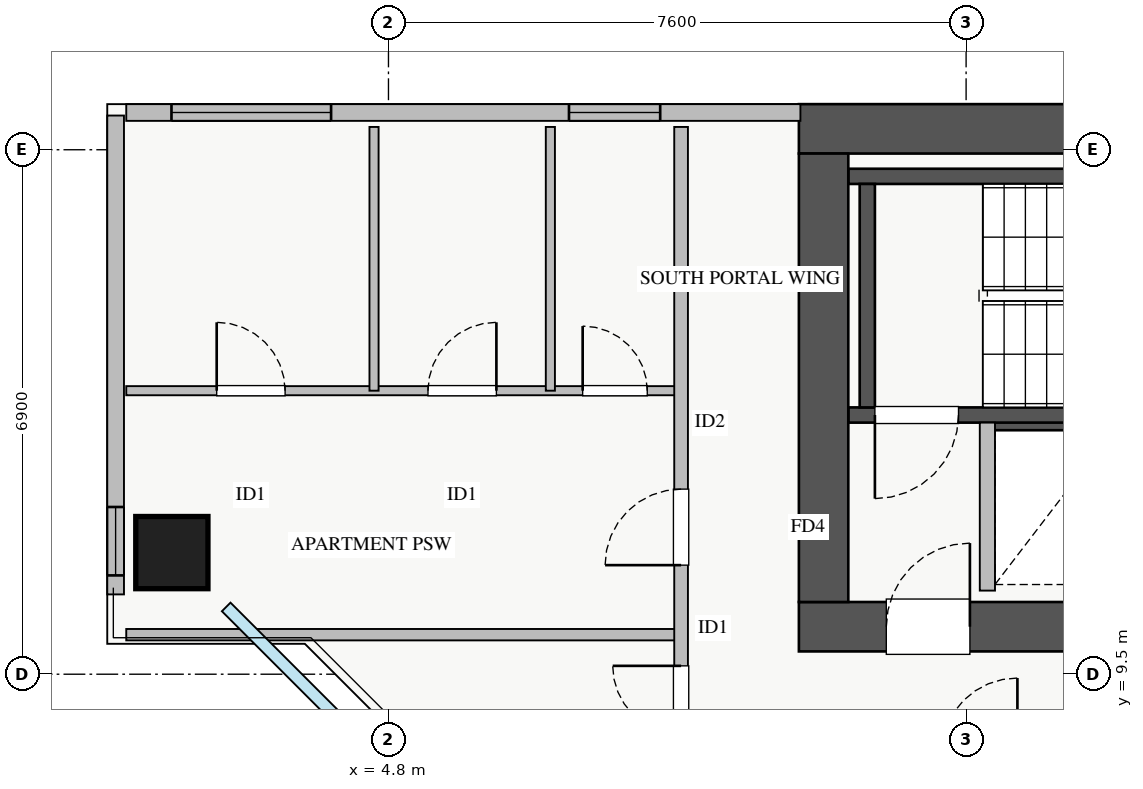
"""IFC4 building model, lengths in metres.
Left out: names, types, materials, properties, quantities, classifications, styles, units other than length and angle.
Written with IfcOpenShell. Run it as: python <this file> out.ifc"""

import sys

from ifc_helpers import new_model, si_unit, direction, frame, frame_2d, origin, origin_2d, place, context, subcontext, project, spatial, rectangle, extrude, source, transform, mapped, element, fill, save


model = new_model("IFC4")
c1 = context("Model", 3, precision=1e-05, world=origin(), true_north=direction((0.0, 1.0)))
c2 = subcontext(c1, "Body", "Model", "MODEL_VIEW")
j1 = project(units=[si_unit("LENGTHUNIT", "METRE"), si_unit("PLANEANGLEUNIT", "RADIAN")], contexts=[c1])
p1 = place(None, origin())
s1 = spatial("IfcSite", under=j1, at=p1, CompositionType="ELEMENT")
p2 = place(p1, origin())
s2 = spatial("IfcBuilding", under=s1, at=p2, CompositionType="ELEMENT")
p3 = place(p2, frame((0.0, 0.0, 160.0)))
s3 = spatial("IfcBuildingStorey", under=s2, at=p3, CompositionType="ELEMENT", Elevation=160.0)
p4 = place(p3, frame((12.68, 12.8, 0.0), z_axis=(0.0, 0.0, 1.0), x_axis=(1.0, 0.0, 0.0)))
e1 = element("IfcWall", 1, at=p4, inside=s3, PredefinedType="SHEAR", context=c2, shape_type="SweptSolid", body=[
    extrude(rectangle(XDim=1.94, YDim=0.18, at=frame_2d((0.97, 0.0))), origin(), (0.0, 0.0, 1.0), 3.07),
])
p5 = place(p3, frame((10.85, 12.91, 0.0), z_axis=(0.0, 0.0, 1.0), x_axis=(1.0, 0.0, 0.0)))
e2 = element("IfcWall", 2, at=p5, inside=s3, PredefinedType="SHEAR", context=c2, shape_type="SweptSolid", body=[
    extrude(rectangle(XDim=7.3, YDim=0.2, at=frame_2d((3.65, 0.0))), origin(), (0.0, 0.0, 1.0), 3.25),
])
p6 = place(p5, frame((0.35, 0.0, 0.0)))
e3 = element("IfcOpeningElement", 3, at=p6, cuts=e2, PredefinedType="OPENING", context=c2, shape_type="SweptSolid", body=[
    extrude(rectangle(XDim=1.1, YDim=2.05, at=frame_2d((0.55, 1.025))), frame((0.0, 0.11, 0.0), z_axis=(0.0, -1.0, 0.0), x_axis=(1.0, 0.0, 0.0)), (0.0, 0.0, 1.0), 0.22),
])
p7 = place(p3, frame((10.85, 16.05, 0.0), z_axis=(0.0, 0.0, 1.0), x_axis=(1.0, 0.0, 0.0)))
e4 = element("IfcWall", 4, at=p7, inside=s3, PredefinedType="SHEAR", context=c2, shape_type="SweptSolid", body=[
    extrude(rectangle(XDim=7.3, YDim=0.2, at=frame_2d((3.65, 0.0))), origin(), (0.0, 0.0, 1.0), 3.25),
])
p8 = place(p3, frame((11.1, 13.01, 0.0), z_axis=(0.0, 0.0, 1.0), x_axis=(0.0, 1.0, 0.0)))
e5 = element("IfcWall", 5, at=p8, inside=s3, PredefinedType="SHEAR", context=c2, shape_type="SweptSolid", body=[
    extrude(rectangle(XDim=2.94, YDim=0.2, at=frame_2d((1.47, 0.0))), origin(), (0.0, 0.0, 1.0), 3.25),
])
p9 = place(p3, frame((10.2, 10.125, 0.0), z_axis=(0.0, 0.0, 1.0), x_axis=(1.0, 0.0, 0.0)))
e6 = element("IfcWall", 6, at=p9, inside=s3, PredefinedType="SHEAR", context=c2, shape_type="SweptSolid", body=[
    extrude(rectangle(XDim=17.6, YDim=0.65, at=frame_2d((8.8, 0.0))), origin(), (0.0, 0.0, 1.0), 3.25),
])
p10 = place(p9, frame((1.15, 0.0, 0.0)))
e7 = element("IfcOpeningElement", 7, at=p10, cuts=e6, PredefinedType="OPENING", context=c2, shape_type="SweptSolid", body=[
    extrude(rectangle(XDim=1.1, YDim=2.05, at=frame_2d((0.55, 1.025))), frame((0.0, 0.335, 0.0), z_axis=(0.0, -1.0, 0.0), x_axis=(1.0, 0.0, 0.0)), (0.0, 0.0, 1.0), 0.67),
])
p11 = place(p9, frame((8.3, 0.0, 0.0)))
e8 = element("IfcOpeningElement", 8, at=p11, cuts=e6, PredefinedType="OPENING", context=c2, shape_type="SweptSolid", body=[
    extrude(rectangle(XDim=1.1, YDim=2.05, at=frame_2d((0.55, 1.025))), frame((0.0, 0.335, 0.0), z_axis=(0.0, -1.0, 0.0), x_axis=(1.0, 0.0, 0.0)), (0.0, 0.0, 1.0), 0.67),
])
p12 = place(p9, frame((4.9, 0.0, 0.0)))
e9 = element("IfcOpeningElement", 9, at=p12, cuts=e6, PredefinedType="OPENING", context=c2, shape_type="SweptSolid", body=[
    extrude(rectangle(XDim=1.1, YDim=2.05, at=frame_2d((0.55, 1.025))), frame((0.0, 0.335, 0.0), z_axis=(0.0, -1.0, 0.0), x_axis=(1.0, 0.0, 0.0)), (0.0, 0.0, 1.0), 0.67),
])
p13 = place(p9, frame((14.74, 0.0, 0.0)))
e10 = element("IfcOpeningElement", 10, at=p13, cuts=e6, PredefinedType="OPENING", context=c2, shape_type="SweptSolid", body=[
    extrude(rectangle(XDim=1.0, YDim=2.05, at=frame_2d((0.5, 1.025))), frame((0.0, 0.335, 0.0), z_axis=(0.0, -1.0, 0.0), x_axis=(1.0, 0.0, 0.0)), (0.0, 0.0, 1.0), 0.67),
])
p14 = place(p9, frame((10.64, 0.0, 0.0)))
e11 = element("IfcOpeningElement", 11, at=p14, cuts=e6, PredefinedType="OPENING", context=c2, shape_type="SweptSolid", body=[
    extrude(rectangle(XDim=1.0, YDim=2.05, at=frame_2d((0.5, 1.025))), frame((0.0, 0.335, 0.0), z_axis=(0.0, -1.0, 0.0), x_axis=(1.0, 0.0, 0.0)), (0.0, 0.0, 1.0), 0.67),
])
p15 = place(p9, frame((13.09, 0.0, 0.0)))
e12 = element("IfcOpeningElement", 12, at=p15, cuts=e6, PredefinedType="OPENING", context=c2, shape_type="SweptSolid", body=[
    extrude(rectangle(XDim=1.0, YDim=2.05, at=frame_2d((0.5, 1.025))), frame((0.0, 0.335, 0.0), z_axis=(0.0, -1.0, 0.0), x_axis=(1.0, 0.0, 0.0)), (0.0, 0.0, 1.0), 0.67),
])
p16 = place(p3, frame((10.2, 16.675, 0.0), z_axis=(0.0, 0.0, 1.0), x_axis=(1.0, 0.0, 0.0)))
e13 = element("IfcWall", 13, at=p16, inside=s3, PredefinedType="SHEAR", context=c2, shape_type="SweptSolid", body=[
    extrude(rectangle(XDim=17.6, YDim=0.65, at=frame_2d((8.8, 0.0))), origin(), (0.0, 0.0, 1.0), 3.25),
])
p17 = place(p3, frame((10.525, 10.45, 0.0), z_axis=(0.0, 0.0, 1.0), x_axis=(0.0, 1.0, 0.0)))
e14 = element("IfcWall", 14, at=p17, inside=s3, PredefinedType="SHEAR", context=c2, shape_type="SweptSolid", body=[
    extrude(rectangle(XDim=5.9, YDim=0.65, at=frame_2d((2.95, 0.0))), origin(), (0.0, 0.0, 1.0), 3.25),
])
m1 = source(origin(), c2, "Body", "SweptSolid", [
    extrude(rectangle(XDim=0.95, YDim=0.95, at=origin_2d()), origin(), (0.0, 0.0, 1.0), 3.25),
])
p18 = place(p3, frame((1.95, 11.1, 0.0), z_axis=(0.0, 0.0, 1.0), x_axis=(1.0, 0.0, 0.0)))
e15 = element("IfcColumn", 15, at=p18, inside=s3, PredefinedType="COLUMN", context=c2, shape_type="MappedRepresentation", body=[
    mapped(m1, transform((0.0, 0.0, 0.0), x_axis=(1.0, 0.0, 0.0), y_axis=(0.0, 1.0, 0.0), z_axis=(0.0, 0.0, 1.0), scale=1.0)),
])
p19 = place(p3, frame((1.35, 16.89, 0.0), z_axis=(0.0, 0.0, 1.0), x_axis=(1.0, 0.0, 0.0)))
e16 = element("IfcWall", 16, at=p19, inside=s3, PredefinedType="STANDARD", context=c2, shape_type="SweptSolid", body=[
    extrude(rectangle(XDim=8.87, YDim=0.22, at=frame_2d((4.435, 0.0))), origin(), (0.0, 0.0, 1.0), 2.61),
])
p20 = place(p19, frame((0.595, 0.0, 0.9)))
e17 = element("IfcOpeningElement", 17, at=p20, cuts=e16, PredefinedType="OPENING", context=c2, shape_type="SweptSolid", body=[
    extrude(rectangle(XDim=2.1, YDim=1.5, at=frame_2d((1.05, 0.75))), frame((0.0, 0.12, 0.0), z_axis=(0.0, -1.0, 0.0), x_axis=(1.0, 0.0, 0.0)), (0.0, 0.0, 1.0), 0.24),
])
p21 = place(p19, frame((5.825, 0.0, 0.9)))
e18 = element("IfcOpeningElement", 18, at=p21, cuts=e16, PredefinedType="OPENING", context=c2, shape_type="SweptSolid", body=[
    extrude(rectangle(XDim=1.2, YDim=1.4, at=frame_2d((0.6, 0.7))), frame((0.0, 0.12, 0.0), z_axis=(0.0, -1.0, 0.0), x_axis=(1.0, 0.0, 0.0)), (0.0, 0.0, 1.0), 0.24),
])
p22 = place(p3, frame((1.21, 10.55, 0.0), z_axis=(0.0, 0.0, 1.0), x_axis=(0.0, 1.0, 0.0)))
e19 = element("IfcWall", 19, at=p22, inside=s3, PredefinedType="STANDARD", context=c2, shape_type="SweptSolid", body=[
    extrude(rectangle(XDim=6.3, YDim=0.22, at=frame_2d((3.15, 0.0))), origin(), (0.0, 0.0, 1.0), 2.61),
])
p23 = place(p22, frame((0.25, 0.0, 0.9)))
e20 = element("IfcOpeningElement", 20, at=p23, cuts=e19, PredefinedType="OPENING", context=c2, shape_type="SweptSolid", body=[
    extrude(rectangle(XDim=0.9, YDim=1.2, at=frame_2d((0.45, 0.6))), frame((0.0, 0.12, 0.0), z_axis=(0.0, -1.0, 0.0), x_axis=(1.0, 0.0, 0.0)), (0.0, 0.0, 1.0), 0.24),
])
p24 = place(p3, frame((12.68, 10.6, 0.0), z_axis=(0.0, 0.0, 1.0), x_axis=(0.0, 1.0, 0.0)))
e21 = element("IfcWall", 21, at=p24, inside=s3, PredefinedType="PARTITIONING", context=c2, shape_type="SweptSolid", body=[
    extrude(rectangle(XDim=2.21, YDim=0.2, at=frame_2d((1.105, 0.0))), origin(), (0.0, 0.0, 1.0), 3.07),
])
p25 = place(p3, frame((1.35, 13.23, 0.0), z_axis=(0.0, 0.0, 1.0), x_axis=(1.0, 0.0, 0.0)))
e22 = element("IfcWall", 22, at=p25, inside=s3, PredefinedType="PLUMBINGWALL", context=c2, shape_type="SweptSolid", body=[
    extrude(rectangle(XDim=7.3, YDim=0.12, at=frame_2d((3.65, 0.0))), origin(), (0.0, 0.0, 1.0), 3.07),
])
p26 = place(p25, frame((1.19, 0.0, 0.0)))
e23 = element("IfcOpeningElement", 23, at=p26, cuts=e22, PredefinedType="OPENING", context=c2, shape_type="SweptSolid", body=[
    extrude(rectangle(XDim=0.9, YDim=2.05, at=frame_2d((0.45, 1.025))), frame((0.0, 0.07, 0.0), z_axis=(0.0, -1.0, 0.0), x_axis=(1.0, 0.0, 0.0)), (0.0, 0.0, 1.0), 0.14),
])
p27 = place(p25, frame((3.97, 0.0, 0.0)))
e24 = element("IfcOpeningElement", 24, at=p27, cuts=e22, PredefinedType="OPENING", context=c2, shape_type="SweptSolid", body=[
    extrude(rectangle(XDim=0.9, YDim=2.05, at=frame_2d((0.45, 1.025))), frame((0.0, 0.07, 0.0), z_axis=(0.0, -1.0, 0.0), x_axis=(1.0, 0.0, 0.0)), (0.0, 0.0, 1.0), 0.14),
])
p28 = place(p25, frame((6.005, 0.0, 0.0)))
e25 = element("IfcOpeningElement", 25, at=p28, cuts=e22, PredefinedType="OPENING", context=c2, shape_type="SweptSolid", body=[
    extrude(rectangle(XDim=0.85, YDim=2.05, at=frame_2d((0.425, 1.025))), frame((0.0, 0.07, 0.0), z_axis=(0.0, -1.0, 0.0), x_axis=(1.0, 0.0, 0.0)), (0.0, 0.0, 1.0), 0.14),
])
for number, where, z_axis, x_axis in (
    (26, (4.61, 13.23, 0.0), (0.0, 0.0, 1.0), (0.0, 1.0, 0.0)),
    (27, (6.93, 13.23, 0.0), (0.0, 0.0, 1.0), (0.0, 1.0, 0.0)),
):
    element("IfcWall", number, at=place(p3, frame(where, z_axis=z_axis, x_axis=x_axis)), inside=s3, PredefinedType="PLUMBINGWALL", context=c2, shape_type="SweptSolid", body=[
        extrude(rectangle(XDim=3.47, YDim=0.12, at=frame_2d((1.735, 0.0))), origin(), (0.0, 0.0, 1.0), 3.07),
    ])
p29 = place(p3, frame((1.35, 10.02, 0.0), z_axis=(0.0, 0.0, 1.0), x_axis=(1.0, 0.0, 0.0)))
e28 = element("IfcWall", 28, at=p29, inside=s3, PredefinedType="PARTITIONING", context=c2, shape_type="SweptSolid", body=[
    extrude(rectangle(XDim=7.3, YDim=0.15, at=frame_2d((3.65, 0.0))), origin(), (0.0, 0.0, 1.0), 3.07),
])
p30 = place(p3, frame((8.65, 5.35, 0.0), z_axis=(0.0, 0.0, 1.0), x_axis=(0.0, 1.0, 0.0)))
e29 = element("IfcWall", 29, at=p30, inside=s3, PredefinedType="PARTITIONING", context=c2, shape_type="SweptSolid", body=[
    extrude(rectangle(XDim=11.35, YDim=0.18, at=frame_2d((5.675, 0.0))), origin(), (0.0, 0.0, 1.0), 3.07),
])
p31 = place(p30, frame((3.36, 0.0, 0.0)))
e30 = element("IfcOpeningElement", 30, at=p31, cuts=e29, PredefinedType="OPENING", context=c2, shape_type="SweptSolid", body=[
    extrude(rectangle(XDim=0.9, YDim=2.05, at=frame_2d((0.45, 1.025))), frame((0.0, 0.1, 0.0), z_axis=(0.0, -1.0, 0.0), x_axis=(1.0, 0.0, 0.0)), (0.0, 0.0, 1.0), 0.2),
])
p32 = place(p30, frame((5.585, 0.0, 0.0)))
e31 = element("IfcOpeningElement", 31, at=p32, cuts=e29, PredefinedType="OPENING", context=c2, shape_type="SweptSolid", body=[
    extrude(rectangle(XDim=1.0, YDim=2.05, at=frame_2d((0.5, 1.025))), frame((0.0, 0.1, 0.0), z_axis=(0.0, -1.0, 0.0), x_axis=(1.0, 0.0, 0.0)), (0.0, 0.0, 1.0), 0.2),
])
m2 = source(origin(), c2, "Body", "SweptSolid", [
    extrude(rectangle(XDim=2.1, YDim=1.5, at=frame_2d((1.05, 0.75))), frame((0.0, 0.03, 0.0), z_axis=(0.0, -1.0, 0.0), x_axis=(1.0, 0.0, 0.0)), (0.0, 0.0, 1.0), 0.06),
])
p33 = place(p20, origin())
e32 = element("IfcWindow", 32, at=p33, inside=s3, PartitioningType="TRIPLE_PANEL_VERTICAL", PredefinedType="WINDOW", context=c2, shape_type="MappedRepresentation", body=[
    mapped(m2, transform((0.0, 0.0, 0.0), x_axis=(1.0, 0.0, 0.0), y_axis=(0.0, 1.0, 0.0), z_axis=(0.0, 0.0, 1.0), scale=1.0)),
])
fill(e17, e32)
m3 = source(origin(), c2, "Body", "SweptSolid", [
    extrude(rectangle(XDim=1.2, YDim=1.4, at=frame_2d((0.6, 0.7))), frame((0.0, 0.03, 0.0), z_axis=(0.0, -1.0, 0.0), x_axis=(1.0, 0.0, 0.0)), (0.0, 0.0, 1.0), 0.06),
])
p34 = place(p21, origin())
e33 = element("IfcWindow", 33, at=p34, inside=s3, PartitioningType="TRIPLE_PANEL_VERTICAL", PredefinedType="WINDOW", context=c2, shape_type="MappedRepresentation", body=[
    mapped(m3, transform((0.0, 0.0, 0.0), x_axis=(1.0, 0.0, 0.0), y_axis=(0.0, 1.0, 0.0), z_axis=(0.0, 0.0, 1.0), scale=1.0)),
])
fill(e18, e33)
m4 = source(origin(), c2, "Body", "SweptSolid", [
    extrude(rectangle(XDim=1.1, YDim=2.05, at=frame_2d((0.55, 1.025))), frame((0.0, 0.025, 0.0), z_axis=(0.0, -1.0, 0.0), x_axis=(1.0, 0.0, 0.0)), (0.0, 0.0, 1.0), 0.05),
])
p35 = place(p10, origin())
e34 = element("IfcDoor", 34, at=p35, inside=s3, OperationType="SINGLE_SWING_RIGHT", PredefinedType="DOOR", context=c2, shape_type="MappedRepresentation", body=[
    mapped(m4, transform((0.0, 0.0, 0.0), x_axis=(1.0, 0.0, 0.0), y_axis=(0.0, 1.0, 0.0), z_axis=(0.0, 0.0, 1.0), scale=1.0)),
])
fill(e7, e34)
p36 = place(p6, frame((1.1, 0.0, 0.0), z_axis=(0.0, 0.0, 1.0), x_axis=(-1.0, 0.0, 0.0)))
e35 = element("IfcDoor", 35, at=p36, inside=s3, OperationType="SINGLE_SWING_LEFT", PredefinedType="DOOR", context=c2, shape_type="MappedRepresentation", body=[
    mapped(m4, transform((0.0, 0.0, 0.0), x_axis=(1.0, 0.0, 0.0), y_axis=(0.0, 1.0, 0.0), z_axis=(0.0, 0.0, 1.0), scale=1.0)),
])
fill(e3, e35)
m5 = source(origin(), c2, "Body", "SweptSolid", [
    extrude(rectangle(XDim=0.9, YDim=2.05, at=frame_2d((0.45, 1.025))), frame((0.0, 0.025, 0.0), z_axis=(0.0, -1.0, 0.0), x_axis=(1.0, 0.0, 0.0)), (0.0, 0.0, 1.0), 0.05),
])
p37 = place(p26, origin())
e36 = element("IfcDoor", 36, at=p37, inside=s3, OperationType="SINGLE_SWING_LEFT", PredefinedType="DOOR", context=c2, shape_type="MappedRepresentation", body=[
    mapped(m5, transform((0.0, 0.0, 0.0), x_axis=(1.0, 0.0, 0.0), y_axis=(0.0, 1.0, 0.0), z_axis=(0.0, 0.0, 1.0), scale=1.0)),
])
fill(e23, e36)
p38 = place(p27, origin())
e37 = element("IfcDoor", 37, at=p38, inside=s3, OperationType="SINGLE_SWING_RIGHT", PredefinedType="DOOR", context=c2, shape_type="MappedRepresentation", body=[
    mapped(m5, transform((0.0, 0.0, 0.0), x_axis=(1.0, 0.0, 0.0), y_axis=(0.0, 1.0, 0.0), z_axis=(0.0, 0.0, 1.0), scale=1.0)),
])
fill(e24, e37)
m6 = source(origin(), c2, "Body", "SweptSolid", [
    extrude(rectangle(XDim=0.85, YDim=2.05, at=frame_2d((0.425, 1.025))), frame((0.0, 0.025, 0.0), z_axis=(0.0, -1.0, 0.0), x_axis=(1.0, 0.0, 0.0)), (0.0, 0.0, 1.0), 0.05),
])
p39 = place(p28, origin())
e38 = element("IfcDoor", 38, at=p39, inside=s3, OperationType="SINGLE_SWING_LEFT", PredefinedType="DOOR", context=c2, shape_type="MappedRepresentation", body=[
    mapped(m6, transform((0.0, 0.0, 0.0), x_axis=(1.0, 0.0, 0.0), y_axis=(0.0, 1.0, 0.0), z_axis=(0.0, 0.0, 1.0), scale=1.0)),
])
fill(e25, e38)
p40 = place(p31, origin())
e39 = element("IfcDoor", 39, at=p40, inside=s3, OperationType="SINGLE_SWING_RIGHT", PredefinedType="DOOR", context=c2, shape_type="MappedRepresentation", body=[
    mapped(m5, transform((0.0, 0.0, 0.0), x_axis=(1.0, 0.0, 0.0), y_axis=(0.0, 1.0, 0.0), z_axis=(0.0, 0.0, 1.0), scale=1.0)),
])
fill(e30, e39)
m7 = source(origin(), c2, "Body", "SweptSolid", [
    extrude(rectangle(XDim=1.0, YDim=2.05, at=frame_2d((0.5, 1.025))), frame((0.0, 0.025, 0.0), z_axis=(0.0, -1.0, 0.0), x_axis=(1.0, 0.0, 0.0)), (0.0, 0.0, 1.0), 0.05),
])
p41 = place(p32, origin())
e40 = element("IfcDoor", 40, at=p41, inside=s3, OperationType="SINGLE_SWING_LEFT", PredefinedType="DOOR", context=c2, shape_type="MappedRepresentation", body=[
    mapped(m7, transform((0.0, 0.0, 0.0), x_axis=(1.0, 0.0, 0.0), y_axis=(0.0, 1.0, 0.0), z_axis=(0.0, 0.0, 1.0), scale=1.0)),
])
fill(e31, e40)
m8 = source(origin(), c2, "Body", "SweptSolid", [
    extrude(rectangle(XDim=0.9, YDim=1.2, at=frame_2d((0.45, 0.6))), frame((0.0, 0.03, 0.0), z_axis=(0.0, -1.0, 0.0), x_axis=(1.0, 0.0, 0.0)), (0.0, 0.0, 1.0), 0.06),
])
p42 = place(p23, origin())
e41 = element("IfcWindow", 41, at=p42, inside=s3, PartitioningType="SINGLE_PANEL", PredefinedType="WINDOW", context=c2, shape_type="MappedRepresentation", body=[
    mapped(m8, transform((0.0, 0.0, 0.0), x_axis=(1.0, 0.0, 0.0), y_axis=(0.0, 1.0, 0.0), z_axis=(0.0, 0.0, 1.0), scale=1.0)),
])
fill(e20, e41)
save(model, sys.argv[1])
